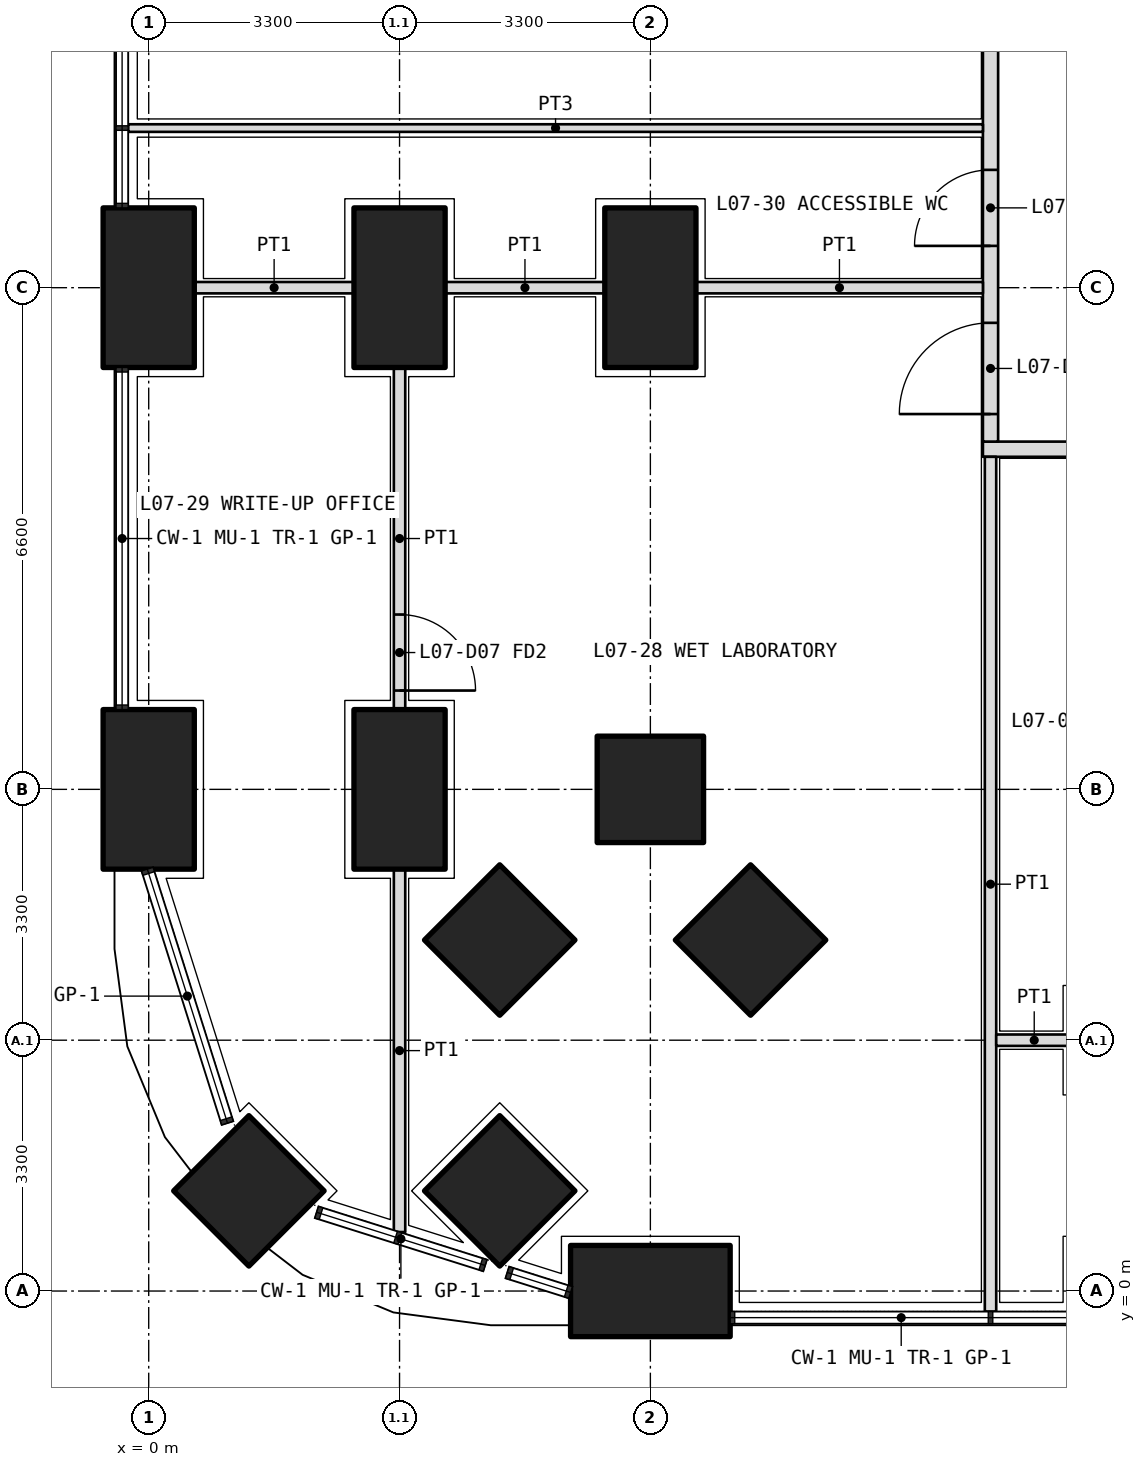
"""IFC4 building model, lengths in metres.
Left out: names, types, materials, properties, quantities, classifications, styles, units other than length and angle.
Written with IfcOpenShell. Run it as: python <this file> out.ifc"""

import sys

from ifc_helpers import new_model, si_unit, direction, frame, frame_2d, origin, origin_2d, place, context, subcontext, project, spatial, rectangle, extrude, element, fill, save


model = new_model("IFC4")
c1 = context("Model", 3, precision=1e-05, world=origin(), true_north=direction((0.0, 1.0)))
c2 = subcontext(c1, "Body", "Model", "MODEL_VIEW")
j1 = project(units=[si_unit("LENGTHUNIT", "METRE"), si_unit("PLANEANGLEUNIT", "RADIAN")], contexts=[c1])
p1 = place(None, origin())
s1 = spatial("IfcSite", under=j1, at=p1, CompositionType="ELEMENT")
p2 = place(p1, origin())
s2 = spatial("IfcBuilding", under=s1, at=p2, CompositionType="ELEMENT")
p3 = place(p2, frame((0.0, 0.0, 33.9)))
s3 = spatial("IfcBuildingStorey", under=s2, at=p3, CompositionType="ELEMENT", Elevation=33.9)
p4 = place(p3, frame((1.318, 1.318, 0.0), z_axis=(0.0, 0.0, 1.0), x_axis=(0.707106781187, 0.707106781187, 0.0)))
e1 = element("IfcColumn", 1, at=p4, inside=s3, PredefinedType="COLUMN", context=c2, shape_type="SweptSolid", body=[
    extrude(rectangle(XDim=1.4, YDim=1.4, at=origin_2d()), origin(), (0.0, 0.0, 1.0), 4.2),
])
for number, where, z_axis, x_axis in (
    (2, (6.6, 0.0, 0.0), (0.0, 0.0, 1.0), (1.0, 0.0, 0.0)),
    (3, (0.0, 6.6, 0.0), (0.0, 0.0, 1.0), (0.0, 1.0, 0.0)),
    (4, (0.0, 13.2, 0.0), (0.0, 0.0, 1.0), (0.0, 1.0, 0.0)),
):
    element("IfcColumn", number, at=place(p3, frame(where, z_axis=z_axis, x_axis=x_axis)), inside=s3, PredefinedType="COLUMN", context=c2, shape_type="SweptSolid", body=[
        extrude(rectangle(XDim=2.1, YDim=1.2, at=origin_2d()), origin(), (0.0, 0.0, 1.0), 4.2),
    ])
for number, where, z_axis, x_axis in (
    (5, (6.6, 6.6, 0.0), (0.0, 0.0, 1.0), (1.0, 0.0, 0.0)),
    (6, (4.618, 1.318, 0.0), (0.0, 0.0, 1.0), (0.707, 0.707, 0.0)),
):
    element("IfcColumn", number, at=place(p3, frame(where, z_axis=z_axis, x_axis=x_axis)), inside=s3, PredefinedType="COLUMN", context=c2, shape_type="SweptSolid", body=[
        extrude(rectangle(XDim=1.4, YDim=1.4, at=origin_2d()), origin(), (0.0, 0.0, 1.0), 4.2),
    ])
for number, where, z_axis, x_axis in (
    (7, (3.3, 6.6, 0.0), (0.0, 0.0, 1.0), (0.0, 1.0, 0.0)),
    (8, (3.3, 13.2, 0.0), (0.0, 0.0, 1.0), (0.0, 1.0, 0.0)),
):
    element("IfcColumn", number, at=place(p3, frame(where, z_axis=z_axis, x_axis=x_axis)), inside=s3, PredefinedType="COLUMN", context=c2, shape_type="SweptSolid", body=[
        extrude(rectangle(XDim=2.1, YDim=1.2, at=origin_2d()), origin(), (0.0, 0.0, 1.0), 4.2),
    ])
for number, where, z_axis, x_axis in (
    (9, (4.618, 4.618, 0.0), (0.0, 0.0, 1.0), (0.707, 0.707, 0.0)),
    (10, (7.918, 4.618, 0.0), (0.0, 0.0, 1.0), (0.707, 0.707, 0.0)),
):
    element("IfcColumn", number, at=place(p3, frame(where, z_axis=z_axis, x_axis=x_axis)), inside=s3, PredefinedType="COLUMN", context=c2, shape_type="SweptSolid", body=[
        extrude(rectangle(XDim=1.4, YDim=1.4, at=origin_2d()), origin(), (0.0, 0.0, 1.0), 4.2),
    ])
p5 = place(p3, frame((6.6, 13.2, 0.0), z_axis=(0.0, 0.0, 1.0), x_axis=(0.0, 1.0, 0.0)))
e11 = element("IfcColumn", 11, at=p5, inside=s3, PredefinedType="COLUMN", context=c2, shape_type="SweptSolid", body=[
    extrude(rectangle(XDim=2.1, YDim=1.2, at=origin_2d()), origin(), (0.0, 0.0, 1.0), 4.2),
])
p6 = place(p3, frame((10.975, 11.075, 0.0), z_axis=(0.0, 0.0, 1.0), x_axis=(1.0, 0.0, 0.0)))
e12 = element("IfcWall", 12, at=p6, inside=s3, PredefinedType="PARTITIONING", context=c2, shape_type="SweptSolid", body=[
    extrude(rectangle(XDim=30.85, YDim=0.2, at=frame_2d((15.425, 0.0))), origin(), (0.0, 0.0, 1.0), 2.85),
])
p7 = place(p6, frame((2.312, 0.0, 0.0)))
e13 = element("IfcOpeningElement", 13, at=p7, cuts=e12, PredefinedType="OPENING", context=c2, shape_type="SweptSolid", body=[
    extrude(rectangle(XDim=1.0, YDim=2.1, at=frame_2d((0.5, 1.05))), frame((0.0, 0.11, 0.0), z_axis=(0.0, -1.0, 0.0), x_axis=(1.0, 0.0, 0.0)), (0.0, 0.0, 1.0), 0.22),
])
p8 = place(p6, frame((8.325, 0.0, 0.0)))
e14 = element("IfcOpeningElement", 14, at=p8, cuts=e12, PredefinedType="OPENING", context=c2, shape_type="SweptSolid", body=[
    extrude(rectangle(XDim=1.0, YDim=2.1, at=frame_2d((0.5, 1.05))), frame((0.0, 0.11, 0.0), z_axis=(0.0, -1.0, 0.0), x_axis=(1.0, 0.0, 0.0)), (0.0, 0.0, 1.0), 0.22),
])
p9 = place(p6, frame((13.175, 0.0, 0.0)))
e15 = element("IfcOpeningElement", 15, at=p9, cuts=e12, PredefinedType="OPENING", context=c2, shape_type="SweptSolid", body=[
    extrude(rectangle(XDim=1.2, YDim=2.1, at=frame_2d((0.6, 1.05))), frame((0.0, 0.11, 0.0), z_axis=(0.0, -1.0, 0.0), x_axis=(1.0, 0.0, 0.0)), (0.0, 0.0, 1.0), 0.22),
])
p10 = place(p6, frame((19.875, 0.0, 0.0)))
e16 = element("IfcOpeningElement", 16, at=p10, cuts=e12, PredefinedType="OPENING", context=c2, shape_type="SweptSolid", body=[
    extrude(rectangle(XDim=1.0, YDim=2.1, at=frame_2d((0.5, 1.05))), frame((0.0, 0.11, 0.0), z_axis=(0.0, -1.0, 0.0), x_axis=(1.0, 0.0, 0.0)), (0.0, 0.0, 1.0), 0.22),
])
p11 = place(p6, frame((27.538, 0.0, 0.0)))
e17 = element("IfcOpeningElement", 17, at=p11, cuts=e12, PredefinedType="OPENING", context=c2, shape_type="SweptSolid", body=[
    extrude(rectangle(XDim=1.0, YDim=2.1, at=frame_2d((0.5, 1.05))), frame((0.0, 0.11, 0.0), z_axis=(0.0, -1.0, 0.0), x_axis=(1.0, 0.0, 0.0)), (0.0, 0.0, 1.0), 0.22),
])
p12 = place(p3, frame((11.075, 11.175, 0.0), z_axis=(0.0, 0.0, 1.0), x_axis=(0.0, 1.0, 0.0)))
e18 = element("IfcWall", 18, at=p12, inside=s3, PredefinedType="PARTITIONING", context=c2, shape_type="SweptSolid", body=[
    extrude(rectangle(XDim=23.85, YDim=0.2, at=frame_2d((11.925, 0.0))), origin(), (0.0, 0.0, 1.0), 2.85),
])
p13 = place(p12, frame((0.363, 0.0, 0.0)))
e19 = element("IfcOpeningElement", 19, at=p13, cuts=e18, PredefinedType="OPENING", context=c2, shape_type="SweptSolid", body=[
    extrude(rectangle(XDim=1.2, YDim=2.1, at=frame_2d((0.6, 1.05))), frame((0.0, 0.11, 0.0), z_axis=(0.0, -1.0, 0.0), x_axis=(1.0, 0.0, 0.0)), (0.0, 0.0, 1.0), 0.22),
])
p14 = place(p12, frame((2.575, 0.0, 0.0)))
e20 = element("IfcOpeningElement", 20, at=p14, cuts=e18, PredefinedType="OPENING", context=c2, shape_type="SweptSolid", body=[
    extrude(rectangle(XDim=1.0, YDim=2.1, at=frame_2d((0.5, 1.05))), frame((0.0, 0.11, 0.0), z_axis=(0.0, -1.0, 0.0), x_axis=(1.0, 0.0, 0.0)), (0.0, 0.0, 1.0), 0.22),
])
p15 = place(p12, frame((5.65, 0.0, 0.0)))
e21 = element("IfcOpeningElement", 21, at=p15, cuts=e18, PredefinedType="OPENING", context=c2, shape_type="SweptSolid", body=[
    extrude(rectangle(XDim=0.9, YDim=2.1, at=frame_2d((0.45, 1.05))), frame((0.0, 0.11, 0.0), z_axis=(0.0, -1.0, 0.0), x_axis=(1.0, 0.0, 0.0)), (0.0, 0.0, 1.0), 0.22),
])
p16 = place(p12, frame((9.5, 0.0, 0.0)))
e22 = element("IfcOpeningElement", 22, at=p16, cuts=e18, PredefinedType="OPENING", context=c2, shape_type="SweptSolid", body=[
    extrude(rectangle(XDim=0.9, YDim=2.1, at=frame_2d((0.45, 1.05))), frame((0.0, 0.11, 0.0), z_axis=(0.0, -1.0, 0.0), x_axis=(1.0, 0.0, 0.0)), (0.0, 0.0, 1.0), 0.22),
])
p17 = place(p12, frame((13.025, 0.0, 0.0)))
e23 = element("IfcOpeningElement", 23, at=p17, cuts=e18, PredefinedType="OPENING", context=c2, shape_type="SweptSolid", body=[
    extrude(rectangle(XDim=1.0, YDim=2.1, at=frame_2d((0.5, 1.05))), frame((0.0, 0.11, 0.0), z_axis=(0.0, -1.0, 0.0), x_axis=(1.0, 0.0, 0.0)), (0.0, 0.0, 1.0), 0.22),
])
p18 = place(p12, frame((16.375, 0.0, 0.0)))
e24 = element("IfcOpeningElement", 24, at=p18, cuts=e18, PredefinedType="OPENING", context=c2, shape_type="SweptSolid", body=[
    extrude(rectangle(XDim=1.0, YDim=2.1, at=frame_2d((0.5, 1.05))), frame((0.0, 0.11, 0.0), z_axis=(0.0, -1.0, 0.0), x_axis=(1.0, 0.0, 0.0)), (0.0, 0.0, 1.0), 0.22),
])
p19 = place(p12, frame((19.675, 0.0, 0.0)))
e25 = element("IfcOpeningElement", 25, at=p19, cuts=e18, PredefinedType="OPENING", context=c2, shape_type="SweptSolid", body=[
    extrude(rectangle(XDim=1.0, YDim=2.1, at=frame_2d((0.5, 1.05))), frame((0.0, 0.11, 0.0), z_axis=(0.0, -1.0, 0.0), x_axis=(1.0, 0.0, 0.0)), (0.0, 0.0, 1.0), 0.22),
])
p20 = place(p12, frame((22.387, 0.0, 0.0)))
e26 = element("IfcOpeningElement", 26, at=p20, cuts=e18, PredefinedType="OPENING", context=c2, shape_type="SweptSolid", body=[
    extrude(rectangle(XDim=1.0, YDim=2.1, at=frame_2d((0.5, 1.05))), frame((0.0, 0.11, 0.0), z_axis=(0.0, -1.0, 0.0), x_axis=(1.0, 0.0, 0.0)), (0.0, 0.0, 1.0), 0.22),
])
p21 = place(p3, frame((11.075, -0.27, 0.0), z_axis=(0.0, 0.0, 1.0), x_axis=(0.0, 1.0, 0.0)))
e27 = element("IfcWall", 27, at=p21, inside=s3, PredefinedType="PARTITIONING", context=c2, shape_type="SweptSolid", body=[
    extrude(rectangle(XDim=11.245, YDim=0.15, at=frame_2d((5.623, 0.0))), origin(), (0.0, 0.0, 1.0), 2.7),
])
p22 = place(p3, frame((11.15, 3.3, 0.0), z_axis=(0.0, 0.0, 1.0), x_axis=(1.0, 0.0, 0.0)))
e28 = element("IfcWall", 28, at=p22, inside=s3, PredefinedType="PARTITIONING", context=c2, shape_type="SweptSolid", body=[
    extrude(rectangle(XDim=1.0, YDim=0.15, at=frame_2d((0.5, 0.0))), origin(), (0.0, 0.0, 1.0), 3.9),
])
p23 = place(p3, frame((3.3, 12.15, 0.0), z_axis=(0.0, 0.0, 1.0), x_axis=(0.0, -1.0, 0.0)))
e29 = element("IfcWall", 29, at=p23, inside=s3, PredefinedType="PARTITIONING", context=c2, shape_type="SweptSolid", body=[
    extrude(rectangle(XDim=4.5, YDim=0.15, at=frame_2d((2.25, 0.0))), origin(), (0.0, 0.0, 1.0), 3.9),
])
p24 = place(p23, frame((3.25, 0.0, 0.0)))
e30 = element("IfcOpeningElement", 30, at=p24, cuts=e29, PredefinedType="OPENING", context=c2, shape_type="SweptSolid", body=[
    extrude(rectangle(XDim=1.0, YDim=2.1, at=frame_2d((0.5, 1.05))), frame((0.0, 0.085, 0.0), z_axis=(0.0, -1.0, 0.0), x_axis=(1.0, 0.0, 0.0)), (0.0, 0.0, 1.0), 0.17),
])
p25 = place(p3, frame((3.3, 5.55, 0.0), z_axis=(0.0, 0.0, 1.0), x_axis=(0.0, -1.0, 0.0)))
e31 = element("IfcWall", 31, at=p25, inside=s3, PredefinedType="PARTITIONING", context=c2, shape_type="SweptSolid", body=[
    extrude(rectangle(XDim=4.774, YDim=0.15, at=frame_2d((2.387, 0.0))), origin(), (0.0, 0.0, 1.0), 2.7),
])
p26 = place(p3, frame((-0.27, 15.3, 0.0), z_axis=(0.0, 0.0, 1.0), x_axis=(1.0, 0.0, 0.0)))
e32 = element("IfcWall", 32, at=p26, inside=s3, PredefinedType="PARTITIONING", context=c2, shape_type="SweptSolid", body=[
    extrude(rectangle(XDim=11.245, YDim=0.1, at=frame_2d((5.623, 0.0))), origin(), (0.0, 0.0, 1.0), 2.7),
])
p27 = place(p3, frame((0.6, 13.2, 0.0), z_axis=(0.0, 0.0, 1.0), x_axis=(1.0, 0.0, 0.0)))
e33 = element("IfcWall", 33, at=p27, inside=s3, PredefinedType="PARTITIONING", context=c2, shape_type="SweptSolid", body=[
    extrude(rectangle(XDim=2.1, YDim=0.15, at=frame_2d((1.05, 0.0))), origin(), (0.0, 0.0, 1.0), 2.85),
])
p28 = place(p3, frame((3.9, 13.2, 0.0), z_axis=(0.0, 0.0, 1.0), x_axis=(1.0, 0.0, 0.0)))
e34 = element("IfcWall", 34, at=p28, inside=s3, PredefinedType="PARTITIONING", context=c2, shape_type="SweptSolid", body=[
    extrude(rectangle(XDim=2.1, YDim=0.15, at=frame_2d((1.05, 0.0))), origin(), (0.0, 0.0, 1.0), 2.85),
])
p29 = place(p3, frame((7.2, 13.2, 0.0), z_axis=(0.0, 0.0, 1.0), x_axis=(1.0, 0.0, 0.0)))
e35 = element("IfcWall", 35, at=p29, inside=s3, PredefinedType="PARTITIONING", context=c2, shape_type="SweptSolid", body=[
    extrude(rectangle(XDim=3.775, YDim=0.15, at=frame_2d((1.888, 0.0))), origin(), (0.0, 0.0, 1.0), 2.85),
])
p30 = place(p13, origin())
e36 = element("IfcDoor", 36, at=p30, inside=s3, OperationType="DOUBLE_DOOR_SINGLE_SWING", PredefinedType="DOOR", context=c2, shape_type="SweptSolid", body=[
    extrude(rectangle(XDim=1.2, YDim=2.1, at=frame_2d((0.6, 1.05))), frame((0.0, 0.025, 0.0), z_axis=(0.0, -1.0, 0.0), x_axis=(1.0, 0.0, 0.0)), (0.0, 0.0, 1.0), 0.05),
])
fill(e19, e36)
p31 = place(p24, origin())
e37 = element("IfcDoor", 37, at=p31, inside=s3, OperationType="SINGLE_SWING_RIGHT", PredefinedType="DOOR", context=c2, shape_type="SweptSolid", body=[
    extrude(rectangle(XDim=1.0, YDim=2.1, at=frame_2d((0.5, 1.05))), frame((0.0, 0.025, 0.0), z_axis=(0.0, -1.0, 0.0), x_axis=(1.0, 0.0, 0.0)), (0.0, 0.0, 1.0), 0.05),
])
fill(e30, e37)
p32 = place(p14, origin())
e38 = element("IfcDoor", 38, at=p32, inside=s3, OperationType="SINGLE_SWING_LEFT", PredefinedType="DOOR", context=c2, shape_type="SweptSolid", body=[
    extrude(rectangle(XDim=1.0, YDim=2.1, at=frame_2d((0.5, 1.05))), frame((0.0, 0.025, 0.0), z_axis=(0.0, -1.0, 0.0), x_axis=(1.0, 0.0, 0.0)), (0.0, 0.0, 1.0), 0.05),
])
fill(e20, e38)
save(model, sys.argv[1])
